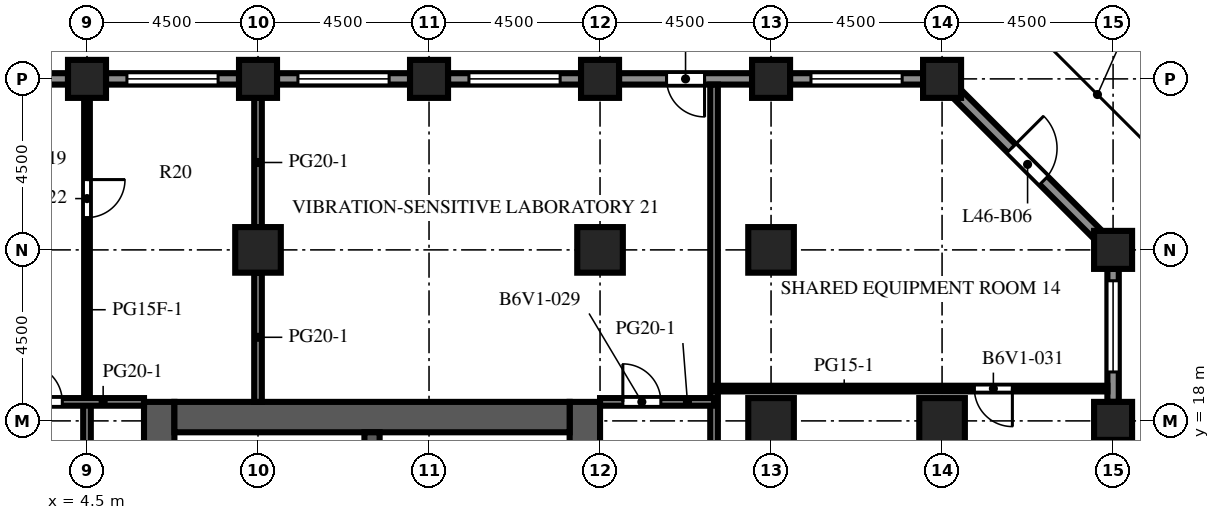
"""IFC4 building model, lengths in metres.
Left out: names, types, materials, properties, quantities, classifications, styles, units other than length and angle.
Written with IfcOpenShell. Run it as: python <this file> out.ifc"""

import sys

from ifc_helpers import new_model, si_unit, direction, frame, frame_2d, origin, origin_2d, place, context, subcontext, project, spatial, rectangle, extrude, element, fill, save


model = new_model("IFC4")
c1 = context("Model", 3, precision=1e-05, world=origin(), true_north=direction((0.0, 1.0)))
c2 = subcontext(c1, "Body", "Model", "MODEL_VIEW")
j1 = project(units=[si_unit("LENGTHUNIT", "METRE"), si_unit("PLANEANGLEUNIT", "RADIAN")], contexts=[c1])
p1 = place(None, origin())
s1 = spatial("IfcSite", under=j1, at=p1, CompositionType="ELEMENT")
p2 = place(p1, origin())
s2 = spatial("IfcBuilding", under=s1, at=p2, CompositionType="ELEMENT")
p3 = place(p2, frame((0.0, 0.0, 203.8)))
s3 = spatial("IfcBuildingStorey", under=s2, at=p3, CompositionType="ELEMENT", Elevation=203.8)
for number, where, z_axis, x_axis in (
    (1, (4.5, 27.0, 0.0), (0.0, 0.0, 1.0), (1.0, 0.0, 0.0)),
    (2, (9.0, 27.0, 0.0), (0.0, 0.0, 1.0), (1.0, 0.0, 0.0)),
    (3, (13.5, 27.0, 0.0), (0.0, 0.0, 1.0), (1.0, 0.0, 0.0)),
    (4, (18.0, 27.0, 0.0), (0.0, 0.0, 1.0), (1.0, 0.0, 0.0)),
    (5, (22.5, 27.0, 0.0), (0.0, 0.0, 1.0), (1.0, 0.0, 0.0)),
    (6, (27.0, 27.0, 0.0), (0.0, 0.0, 1.0), (1.0, 0.0, 0.0)),
    (7, (31.5, 18.0, 0.0), (0.0, 0.0, 1.0), (1.0, 0.0, 0.0)),
    (8, (31.5, 22.5, 0.0), (0.0, 0.0, 1.0), (1.0, 0.0, 0.0)),
):
    element("IfcColumn", number, at=place(p3, frame(where, z_axis=z_axis, x_axis=x_axis)), inside=s3, PredefinedType="COLUMN", context=c2, shape_type="SweptSolid", body=[
        extrude(rectangle(XDim=1.0, YDim=1.0, at=origin_2d()), origin(), (0.0, 0.0, 1.0), 4.1),
    ])
for number, where, z_axis, x_axis in (
    (9, (9.0, 22.5, 0.0), (0.0, 0.0, 1.0), (1.0, 0.0, 0.0)),
    (10, (18.0, 22.5, 0.0), (0.0, 0.0, 1.0), (1.0, 0.0, 0.0)),
    (11, (22.5, 18.0, 0.0), (0.0, 0.0, 1.0), (1.0, 0.0, 0.0)),
    (12, (22.5, 22.5, 0.0), (0.0, 0.0, 1.0), (1.0, 0.0, 0.0)),
    (13, (27.0, 18.0, 0.0), (0.0, 0.0, 1.0), (1.0, 0.0, 0.0)),
):
    element("IfcColumn", number, at=place(p3, frame(where, z_axis=z_axis, x_axis=x_axis)), inside=s3, PredefinedType="COLUMN", context=c2, shape_type="SweptSolid", body=[
        extrude(rectangle(XDim=1.2, YDim=1.2, at=origin_2d()), origin(), (0.0, 0.0, 1.0), 4.1),
    ])
p4 = place(p3, frame((6.4, -9.0, 0.0), z_axis=(0.0, 0.0, 1.0), x_axis=(0.0, 1.0, 0.0)))
e14 = element("IfcWall", 14, at=p4, inside=s3, PredefinedType="SHEAR", context=c2, shape_type="SweptSolid", body=[
    extrude(rectangle(XDim=27.5, YDim=0.8, at=frame_2d((13.75, 0.0))), origin(), (0.0, 0.0, 1.0), 4.1),
])
p5 = place(p4, frame((12.55, 0.0, 0.0)))
e15 = element("IfcOpeningElement", 15, at=p5, cuts=e14, PredefinedType="OPENING", context=c2, shape_type="SweptSolid", body=[
    extrude(rectangle(XDim=2.4, YDim=2.4, at=frame_2d((1.2, 1.2))), frame((0.0, 0.41, 0.0), z_axis=(0.0, -1.0, 0.0), x_axis=(1.0, 0.0, 0.0)), (0.0, 0.0, 1.0), 0.82),
])
p6 = place(p4, frame((3.95, 0.0, 0.0)))
e16 = element("IfcOpeningElement", 16, at=p6, cuts=e14, PredefinedType="OPENING", context=c2, shape_type="SweptSolid", body=[
    extrude(rectangle(XDim=1.2, YDim=2.1, at=frame_2d((0.6, 1.05))), frame((0.0, 0.41, 0.0), z_axis=(0.0, -1.0, 0.0), x_axis=(1.0, 0.0, 0.0)), (0.0, 0.0, 1.0), 0.82),
])
p7 = place(p4, frame((22.35, 0.0, 0.0)))
e17 = element("IfcOpeningElement", 17, at=p7, cuts=e14, PredefinedType="OPENING", context=c2, shape_type="SweptSolid", body=[
    extrude(rectangle(XDim=1.2, YDim=2.1, at=frame_2d((0.6, 1.05))), frame((0.0, 0.41, 0.0), z_axis=(0.0, -1.0, 0.0), x_axis=(1.0, 0.0, 0.0)), (0.0, 0.0, 1.0), 0.82),
])
p8 = place(p3, frame((17.6, -9.0, 0.0), z_axis=(0.0, 0.0, 1.0), x_axis=(0.0, 1.0, 0.0)))
e18 = element("IfcWall", 18, at=p8, inside=s3, PredefinedType="SHEAR", context=c2, shape_type="SweptSolid", body=[
    extrude(rectangle(XDim=27.5, YDim=0.8, at=frame_2d((13.75, 0.0))), origin(), (0.0, 0.0, 1.0), 4.1),
])
p9 = place(p8, frame((12.55, 0.0, 0.0)))
e19 = element("IfcOpeningElement", 19, at=p9, cuts=e18, PredefinedType="OPENING", context=c2, shape_type="SweptSolid", body=[
    extrude(rectangle(XDim=2.4, YDim=2.4, at=frame_2d((1.2, 1.2))), frame((0.0, 0.41, 0.0), z_axis=(0.0, -1.0, 0.0), x_axis=(1.0, 0.0, 0.0)), (0.0, 0.0, 1.0), 0.82),
])
p10 = place(p8, frame((6.825, 0.0, 0.0)))
e20 = element("IfcOpeningElement", 20, at=p10, cuts=e18, PredefinedType="OPENING", context=c2, shape_type="SweptSolid", body=[
    extrude(rectangle(XDim=1.2, YDim=2.1, at=frame_2d((0.6, 1.05))), frame((0.0, 0.41, 0.0), z_axis=(0.0, -1.0, 0.0), x_axis=(1.0, 0.0, 0.0)), (0.0, 0.0, 1.0), 0.82),
])
p11 = place(p8, frame((19.475, 0.0, 0.0)))
e21 = element("IfcOpeningElement", 21, at=p11, cuts=e18, PredefinedType="OPENING", context=c2, shape_type="SweptSolid", body=[
    extrude(rectangle(XDim=1.2, YDim=2.1, at=frame_2d((0.6, 1.05))), frame((0.0, 0.41, 0.0), z_axis=(0.0, -1.0, 0.0), x_axis=(1.0, 0.0, 0.0)), (0.0, 0.0, 1.0), 0.82),
])
p12 = place(p3, frame((6.8, 18.1, 0.0), z_axis=(0.0, 0.0, 1.0), x_axis=(1.0, 0.0, 0.0)))
e22 = element("IfcWall", 22, at=p12, inside=s3, PredefinedType="SHEAR", context=c2, shape_type="SweptSolid", body=[
    extrude(rectangle(XDim=10.4, YDim=0.8, at=frame_2d((5.2, 0.0))), origin(), (0.0, 0.0, 1.0), 4.1),
])
p13 = place(p3, frame((12.0, 10.2, 0.0), z_axis=(0.0, 0.0, 1.0), x_axis=(0.0, 1.0, 0.0)))
e23 = element("IfcWall", 23, at=p13, inside=s3, PredefinedType="SHEAR", context=c2, shape_type="SweptSolid", body=[
    extrude(rectangle(XDim=7.5, YDim=0.4, at=frame_2d((3.75, 0.0))), origin(), (0.0, 0.0, 1.0), 4.1),
])
p14 = place(p3, frame((31.5, 22.0, 0.0), z_axis=(0.0, 0.0, 1.0), x_axis=(0.0, -1.0, 0.0)))
e24 = element("IfcWall", 24, at=p14, inside=s3, PredefinedType="SOLIDWALL", context=c2, shape_type="SweptSolid", body=[
    extrude(rectangle(XDim=3.5, YDim=0.3, at=frame_2d((1.75, 0.0))), origin(), (0.0, 0.0, 1.0), 2.85),
])
p15 = place(p14, frame((0.312, 0.0, 0.8)))
e25 = element("IfcOpeningElement", 25, at=p15, cuts=e24, PredefinedType="OPENING", context=c2, shape_type="SweptSolid", body=[
    extrude(rectangle(XDim=2.4, YDim=1.7, at=frame_2d((1.2, 0.85))), frame((0.0, 0.16, 0.0), z_axis=(0.0, -1.0, 0.0), x_axis=(1.0, 0.0, 0.0)), (0.0, 0.0, 1.0), 0.32),
])
p16 = place(p3, frame((27.394, 26.606, 0.0), z_axis=(0.0, 0.0, 1.0), x_axis=(0.707106781187, -0.707106781187, 0.0)))
e26 = element("IfcWall", 26, at=p16, inside=s3, PredefinedType="SOLIDWALL", context=c2, shape_type="SweptSolid", body=[
    extrude(rectangle(XDim=5.25, YDim=0.3, at=frame_2d((2.625, 0.0))), origin(), (0.0, 0.0, 1.0), 2.85),
])
p17 = place(p16, frame((2.025, 0.0, 0.0)))
e27 = element("IfcOpeningElement", 27, at=p17, cuts=e26, PredefinedType="OPENING", context=c2, shape_type="SweptSolid", body=[
    extrude(rectangle(XDim=1.2, YDim=2.2, at=frame_2d((0.6, 1.1))), frame((0.0, 0.16, 0.0), z_axis=(0.0, -1.0, 0.0), x_axis=(1.0, 0.0, 0.0)), (0.0, 0.0, 1.0), 0.32),
])
p18 = place(p3, frame((23.0, 27.0, 0.0), z_axis=(0.0, 0.0, 1.0), x_axis=(1.0, 0.0, 0.0)))
e28 = element("IfcWall", 28, at=p18, inside=s3, PredefinedType="SOLIDWALL", context=c2, shape_type="SweptSolid", body=[
    extrude(rectangle(XDim=3.5, YDim=0.3, at=frame_2d((1.75, 0.0))), origin(), (0.0, 0.0, 1.0), 2.85),
])
p19 = place(p18, frame((0.55, 0.0, 0.8)))
e29 = element("IfcOpeningElement", 29, at=p19, cuts=e28, PredefinedType="OPENING", context=c2, shape_type="SweptSolid", body=[
    extrude(rectangle(XDim=2.4, YDim=1.7, at=frame_2d((1.2, 0.85))), frame((0.0, 0.16, 0.0), z_axis=(0.0, -1.0, 0.0), x_axis=(1.0, 0.0, 0.0)), (0.0, 0.0, 1.0), 0.32),
])
p20 = place(p3, frame((18.5, 27.0, 0.0), z_axis=(0.0, 0.0, 1.0), x_axis=(1.0, 0.0, 0.0)))
e30 = element("IfcWall", 30, at=p20, inside=s3, PredefinedType="SOLIDWALL", context=c2, shape_type="SweptSolid", body=[
    extrude(rectangle(XDim=3.5, YDim=0.3, at=frame_2d((1.75, 0.0))), origin(), (0.0, 0.0, 1.0), 2.85),
])
p21 = place(p20, frame((1.25, 0.0, 0.0)))
e31 = element("IfcOpeningElement", 31, at=p21, cuts=e30, PredefinedType="OPENING", context=c2, shape_type="SweptSolid", body=[
    extrude(rectangle(XDim=1.0, YDim=2.2, at=frame_2d((0.5, 1.1))), frame((0.0, 0.16, 0.0), z_axis=(0.0, -1.0, 0.0), x_axis=(1.0, 0.0, 0.0)), (0.0, 0.0, 1.0), 0.32),
])
p22 = place(p3, frame((14.0, 27.0, 0.0), z_axis=(0.0, 0.0, 1.0), x_axis=(1.0, 0.0, 0.0)))
e32 = element("IfcWall", 32, at=p22, inside=s3, PredefinedType="SOLIDWALL", context=c2, shape_type="SweptSolid", body=[
    extrude(rectangle(XDim=3.5, YDim=0.3, at=frame_2d((1.75, 0.0))), origin(), (0.0, 0.0, 1.0), 2.85),
])
p23 = place(p22, frame((0.55, 0.0, 0.8)))
e33 = element("IfcOpeningElement", 33, at=p23, cuts=e32, PredefinedType="OPENING", context=c2, shape_type="SweptSolid", body=[
    extrude(rectangle(XDim=2.4, YDim=1.7, at=frame_2d((1.2, 0.85))), frame((0.0, 0.16, 0.0), z_axis=(0.0, -1.0, 0.0), x_axis=(1.0, 0.0, 0.0)), (0.0, 0.0, 1.0), 0.32),
])
p24 = place(p3, frame((9.5, 27.0, 0.0), z_axis=(0.0, 0.0, 1.0), x_axis=(1.0, 0.0, 0.0)))
e34 = element("IfcWall", 34, at=p24, inside=s3, PredefinedType="SOLIDWALL", context=c2, shape_type="SweptSolid", body=[
    extrude(rectangle(XDim=3.5, YDim=0.3, at=frame_2d((1.75, 0.0))), origin(), (0.0, 0.0, 1.0), 2.85),
])
p25 = place(p24, frame((0.55, 0.0, 0.8)))
e35 = element("IfcOpeningElement", 35, at=p25, cuts=e34, PredefinedType="OPENING", context=c2, shape_type="SweptSolid", body=[
    extrude(rectangle(XDim=2.4, YDim=1.7, at=frame_2d((1.2, 0.85))), frame((0.0, 0.16, 0.0), z_axis=(0.0, -1.0, 0.0), x_axis=(1.0, 0.0, 0.0)), (0.0, 0.0, 1.0), 0.32),
])
p26 = place(p3, frame((5.0, 27.0, 0.0), z_axis=(0.0, 0.0, 1.0), x_axis=(1.0, 0.0, 0.0)))
e36 = element("IfcWall", 36, at=p26, inside=s3, PredefinedType="SOLIDWALL", context=c2, shape_type="SweptSolid", body=[
    extrude(rectangle(XDim=3.5, YDim=0.3, at=frame_2d((1.75, 0.0))), origin(), (0.0, 0.0, 1.0), 2.85),
])
p27 = place(p26, frame((0.55, 0.0, 0.8)))
e37 = element("IfcOpeningElement", 37, at=p27, cuts=e36, PredefinedType="OPENING", context=c2, shape_type="SweptSolid", body=[
    extrude(rectangle(XDim=2.4, YDim=1.7, at=frame_2d((1.2, 0.85))), frame((0.0, 0.16, 0.0), z_axis=(0.0, -1.0, 0.0), x_axis=(1.0, 0.0, 0.0)), (0.0, 0.0, 1.0), 0.32),
])
p28 = place(p3, frame((0.5, 27.0, 0.0), z_axis=(0.0, 0.0, 1.0), x_axis=(1.0, 0.0, 0.0)))
e38 = element("IfcWall", 38, at=p28, inside=s3, PredefinedType="SOLIDWALL", context=c2, shape_type="SweptSolid", body=[
    extrude(rectangle(XDim=3.5, YDim=0.3, at=frame_2d((1.75, 0.0))), origin(), (0.0, 0.0, 1.0), 2.85),
])
p29 = place(p28, frame((0.55, 0.0, 0.8)))
e39 = element("IfcOpeningElement", 39, at=p29, cuts=e38, PredefinedType="OPENING", context=c2, shape_type="SweptSolid", body=[
    extrude(rectangle(XDim=2.4, YDim=1.7, at=frame_2d((1.2, 0.85))), frame((0.0, 0.16, 0.0), z_axis=(0.0, -1.0, 0.0), x_axis=(1.0, 0.0, 0.0)), (0.0, 0.0, 1.0), 0.32),
])
p30 = place(p3, frame((8.2, 14.85, 0.0), z_axis=(0.0, 0.0, 1.0), x_axis=(0.0, 1.0, 0.0)))
e40 = element("IfcWall", 40, at=p30, inside=s3, PredefinedType="PARTITIONING", context=c2, shape_type="SweptSolid", body=[
    extrude(rectangle(XDim=2.85, YDim=0.1, at=frame_2d((1.425, 0.0))), origin(), (0.0, 0.0, 1.0), 3.65),
])
p31 = place(p30, frame((0.925, 0.0, 0.0)))
e41 = element("IfcOpeningElement", 41, at=p31, cuts=e40, PredefinedType="OPENING", context=c2, shape_type="SweptSolid", body=[
    extrude(rectangle(XDim=1.0, YDim=2.1, at=frame_2d((0.5, 1.05))), frame((0.0, 0.06, 0.0), z_axis=(0.0, -1.0, 0.0), x_axis=(1.0, 0.0, 0.0)), (0.0, 0.0, 1.0), 0.12),
])
p32 = place(p3, frame((4.5, 26.5, 0.0), z_axis=(0.0, 0.0, 1.0), x_axis=(0.0, -1.0, 0.0)))
e42 = element("IfcWall", 42, at=p32, inside=s3, PredefinedType="PARTITIONING", context=c2, shape_type="SweptSolid", body=[
    extrude(rectangle(XDim=8.0, YDim=0.15, at=frame_2d((4.0, 0.0))), origin(), (0.0, 0.0, 1.0), 3.65),
])
p33 = place(p32, frame((2.15, 0.0, 0.0)))
e43 = element("IfcOpeningElement", 43, at=p33, cuts=e42, PredefinedType="OPENING", context=c2, shape_type="SweptSolid", body=[
    extrude(rectangle(XDim=1.0, YDim=2.1, at=frame_2d((0.5, 1.05))), frame((0.0, 0.085, 0.0), z_axis=(0.0, -1.0, 0.0), x_axis=(1.0, 0.0, 0.0)), (0.0, 0.0, 1.0), 0.17),
])
p34 = place(p3, frame((4.5, 18.5, 0.0), z_axis=(0.0, 0.0, 1.0), x_axis=(0.0, -1.0, 0.0)))
e44 = element("IfcWall", 44, at=p34, inside=s3, PredefinedType="PARTITIONING", context=c2, shape_type="SweptSolid", body=[
    extrude(rectangle(XDim=11.8, YDim=0.2, at=frame_2d((5.9, 0.0))), origin(), (0.0, 0.0, 1.0), 3.65),
])
p35 = place(p34, frame((6.45, 0.0, 0.0)))
e45 = element("IfcOpeningElement", 45, at=p35, cuts=e44, PredefinedType="OPENING", context=c2, shape_type="SweptSolid", body=[
    extrude(rectangle(XDim=1.0, YDim=2.1, at=frame_2d((0.5, 1.05))), frame((0.0, 0.11, 0.0), z_axis=(0.0, -1.0, 0.0), x_axis=(1.0, 0.0, 0.0)), (0.0, 0.0, 1.0), 0.22),
])
for number, where, z_axis, x_axis in (
    (46, (9.0, 18.5, 0.0), (0.0, 0.0, 1.0), (0.0, 1.0, 0.0)),
    (47, (9.0, 23.1, 0.0), (0.0, 0.0, 1.0), (0.0, 1.0, 0.0)),
):
    element("IfcWall", number, at=place(p3, frame(where, z_axis=z_axis, x_axis=x_axis)), inside=s3, PredefinedType="PARTITIONING", context=c2, shape_type="SweptSolid", body=[
        extrude(rectangle(XDim=3.4, YDim=0.2, at=frame_2d((1.7, 0.0))), origin(), (0.0, 0.0, 1.0), 3.65),
    ])
p36 = place(p3, frame((21.0, 6.25, 0.0), z_axis=(0.0, 0.0, 1.0), x_axis=(0.0, 1.0, 0.0)))
e48 = element("IfcWall", 48, at=p36, inside=s3, PredefinedType="PARTITIONING", context=c2, shape_type="SweptSolid", body=[
    extrude(rectangle(XDim=20.6, YDim=0.2, at=frame_2d((10.3, 0.0))), origin(), (0.0, 0.0, 1.0), 3.65),
])
p37 = place(p3, frame((1.5, 18.5, 0.0), z_axis=(0.0, 0.0, 1.0), x_axis=(1.0, 0.0, 0.0)))
e49 = element("IfcWall", 49, at=p37, inside=s3, PredefinedType="PARTITIONING", context=c2, shape_type="SweptSolid", body=[
    extrude(rectangle(XDim=4.5, YDim=0.2, at=frame_2d((2.25, 0.0))), origin(), (0.0, 0.0, 1.0), 3.65),
])
p38 = place(p37, frame((1.35, 0.0, 0.0)))
e50 = element("IfcOpeningElement", 50, at=p38, cuts=e49, PredefinedType="OPENING", context=c2, shape_type="SweptSolid", body=[
    extrude(rectangle(XDim=1.0, YDim=2.1, at=frame_2d((0.5, 1.05))), frame((0.0, 0.11, 0.0), z_axis=(0.0, -1.0, 0.0), x_axis=(1.0, 0.0, 0.0)), (0.0, 0.0, 1.0), 0.22),
])
p39 = place(p3, frame((18.0, 18.5, 0.0), z_axis=(0.0, 0.0, 1.0), x_axis=(1.0, 0.0, 0.0)))
e51 = element("IfcWall", 51, at=p39, inside=s3, PredefinedType="PARTITIONING", context=c2, shape_type="SweptSolid", body=[
    extrude(rectangle(XDim=3.0, YDim=0.2, at=frame_2d((1.5, 0.0))), origin(), (0.0, 0.0, 1.0), 3.65),
])
p40 = place(p39, frame((0.6, 0.0, 0.0)))
e52 = element("IfcOpeningElement", 52, at=p40, cuts=e51, PredefinedType="OPENING", context=c2, shape_type="SweptSolid", body=[
    extrude(rectangle(XDim=1.0, YDim=2.1, at=frame_2d((0.5, 1.05))), frame((0.0, 0.11, 0.0), z_axis=(0.0, -1.0, 0.0), x_axis=(1.0, 0.0, 0.0)), (0.0, 0.0, 1.0), 0.22),
])
p41 = place(p3, frame((21.0, 18.85, 0.0), z_axis=(0.0, 0.0, 1.0), x_axis=(1.0, 0.0, 0.0)))
e53 = element("IfcWall", 53, at=p41, inside=s3, PredefinedType="PARTITIONING", context=c2, shape_type="SweptSolid", body=[
    extrude(rectangle(XDim=10.35, YDim=0.15, at=frame_2d((5.175, 0.0))), origin(), (0.0, 0.0, 1.0), 3.65),
])
p42 = place(p41, frame((6.85, 0.0, 0.0)))
e54 = element("IfcOpeningElement", 54, at=p42, cuts=e53, PredefinedType="OPENING", context=c2, shape_type="SweptSolid", body=[
    extrude(rectangle(XDim=1.0, YDim=2.1, at=frame_2d((0.5, 1.05))), frame((0.0, 0.085, 0.0), z_axis=(0.0, -1.0, 0.0), x_axis=(1.0, 0.0, 0.0)), (0.0, 0.0, 1.0), 0.17),
])
p43 = place(p15, origin())
e55 = element("IfcWindow", 55, at=p43, inside=s3, PartitioningType="SINGLE_PANEL", PredefinedType="WINDOW", context=c2, shape_type="SweptSolid", body=[
    extrude(rectangle(XDim=2.4, YDim=1.7, at=frame_2d((1.2, 0.85))), frame((0.0, 0.03, 0.0), z_axis=(0.0, -1.0, 0.0), x_axis=(1.0, 0.0, 0.0)), (0.0, 0.0, 1.0), 0.06),
])
fill(e25, e55)
p44 = place(p17, origin())
e56 = element("IfcDoor", 56, at=p44, inside=s3, OperationType="SINGLE_SWING_LEFT", PredefinedType="DOOR", context=c2, shape_type="SweptSolid", body=[
    extrude(rectangle(XDim=1.2, YDim=2.2, at=frame_2d((0.6, 1.1))), frame((0.0, 0.025, 0.0), z_axis=(0.0, -1.0, 0.0), x_axis=(1.0, 0.0, 0.0)), (0.0, 0.0, 1.0), 0.05),
])
fill(e27, e56)
p45 = place(p19, origin())
e57 = element("IfcWindow", 57, at=p45, inside=s3, PartitioningType="SINGLE_PANEL", PredefinedType="WINDOW", context=c2, shape_type="SweptSolid", body=[
    extrude(rectangle(XDim=2.4, YDim=1.7, at=frame_2d((1.2, 0.85))), frame((0.0, 0.03, 0.0), z_axis=(0.0, -1.0, 0.0), x_axis=(1.0, 0.0, 0.0)), (0.0, 0.0, 1.0), 0.06),
])
fill(e29, e57)
p46 = place(p21, origin())
e58 = element("IfcDoor", 58, at=p46, inside=s3, OperationType="SINGLE_SWING_RIGHT", PredefinedType="DOOR", context=c2, shape_type="SweptSolid", body=[
    extrude(rectangle(XDim=1.0, YDim=2.2, at=frame_2d((0.5, 1.1))), frame((0.0, 0.025, 0.0), z_axis=(0.0, -1.0, 0.0), x_axis=(1.0, 0.0, 0.0)), (0.0, 0.0, 1.0), 0.05),
])
fill(e31, e58)
p47 = place(p23, origin())
e59 = element("IfcWindow", 59, at=p47, inside=s3, PartitioningType="SINGLE_PANEL", PredefinedType="WINDOW", context=c2, shape_type="SweptSolid", body=[
    extrude(rectangle(XDim=2.4, YDim=1.7, at=frame_2d((1.2, 0.85))), frame((0.0, 0.03, 0.0), z_axis=(0.0, -1.0, 0.0), x_axis=(1.0, 0.0, 0.0)), (0.0, 0.0, 1.0), 0.06),
])
fill(e33, e59)
p48 = place(p25, origin())
e60 = element("IfcWindow", 60, at=p48, inside=s3, PartitioningType="SINGLE_PANEL", PredefinedType="WINDOW", context=c2, shape_type="SweptSolid", body=[
    extrude(rectangle(XDim=2.4, YDim=1.7, at=frame_2d((1.2, 0.85))), frame((0.0, 0.03, 0.0), z_axis=(0.0, -1.0, 0.0), x_axis=(1.0, 0.0, 0.0)), (0.0, 0.0, 1.0), 0.06),
])
fill(e35, e60)
p49 = place(p27, origin())
e61 = element("IfcWindow", 61, at=p49, inside=s3, PartitioningType="SINGLE_PANEL", PredefinedType="WINDOW", context=c2, shape_type="SweptSolid", body=[
    extrude(rectangle(XDim=2.4, YDim=1.7, at=frame_2d((1.2, 0.85))), frame((0.0, 0.03, 0.0), z_axis=(0.0, -1.0, 0.0), x_axis=(1.0, 0.0, 0.0)), (0.0, 0.0, 1.0), 0.06),
])
fill(e37, e61)
p50 = place(p33, origin())
e62 = element("IfcDoor", 62, at=p50, inside=s3, OperationType="SINGLE_SWING_LEFT", PredefinedType="DOOR", context=c2, shape_type="SweptSolid", body=[
    extrude(rectangle(XDim=1.0, YDim=2.1, at=frame_2d((0.5, 1.05))), frame((0.0, 0.025, 0.0), z_axis=(0.0, -1.0, 0.0), x_axis=(1.0, 0.0, 0.0)), (0.0, 0.0, 1.0), 0.05),
])
fill(e43, e62)
p51 = place(p38, origin())
e63 = element("IfcDoor", 63, at=p51, inside=s3, OperationType="SINGLE_SWING_LEFT", PredefinedType="DOOR", context=c2, shape_type="SweptSolid", body=[
    extrude(rectangle(XDim=1.0, YDim=2.1, at=frame_2d((0.5, 1.05))), frame((0.0, 0.025, 0.0), z_axis=(0.0, -1.0, 0.0), x_axis=(1.0, 0.0, 0.0)), (0.0, 0.0, 1.0), 0.05),
])
fill(e50, e63)
p52 = place(p40, origin())
e64 = element("IfcDoor", 64, at=p52, inside=s3, OperationType="SINGLE_SWING_LEFT", PredefinedType="DOOR", context=c2, shape_type="SweptSolid", body=[
    extrude(rectangle(XDim=1.0, YDim=2.1, at=frame_2d((0.5, 1.05))), frame((0.0, 0.025, 0.0), z_axis=(0.0, -1.0, 0.0), x_axis=(1.0, 0.0, 0.0)), (0.0, 0.0, 1.0), 0.05),
])
fill(e52, e64)
p53 = place(p42, origin())
e65 = element("IfcDoor", 65, at=p53, inside=s3, OperationType="SINGLE_SWING_RIGHT", PredefinedType="DOOR", context=c2, shape_type="SweptSolid", body=[
    extrude(rectangle(XDim=1.0, YDim=2.1, at=frame_2d((0.5, 1.05))), frame((0.0, 0.025, 0.0), z_axis=(0.0, -1.0, 0.0), x_axis=(1.0, 0.0, 0.0)), (0.0, 0.0, 1.0), 0.05),
])
fill(e54, e65)
save(model, sys.argv[1])
